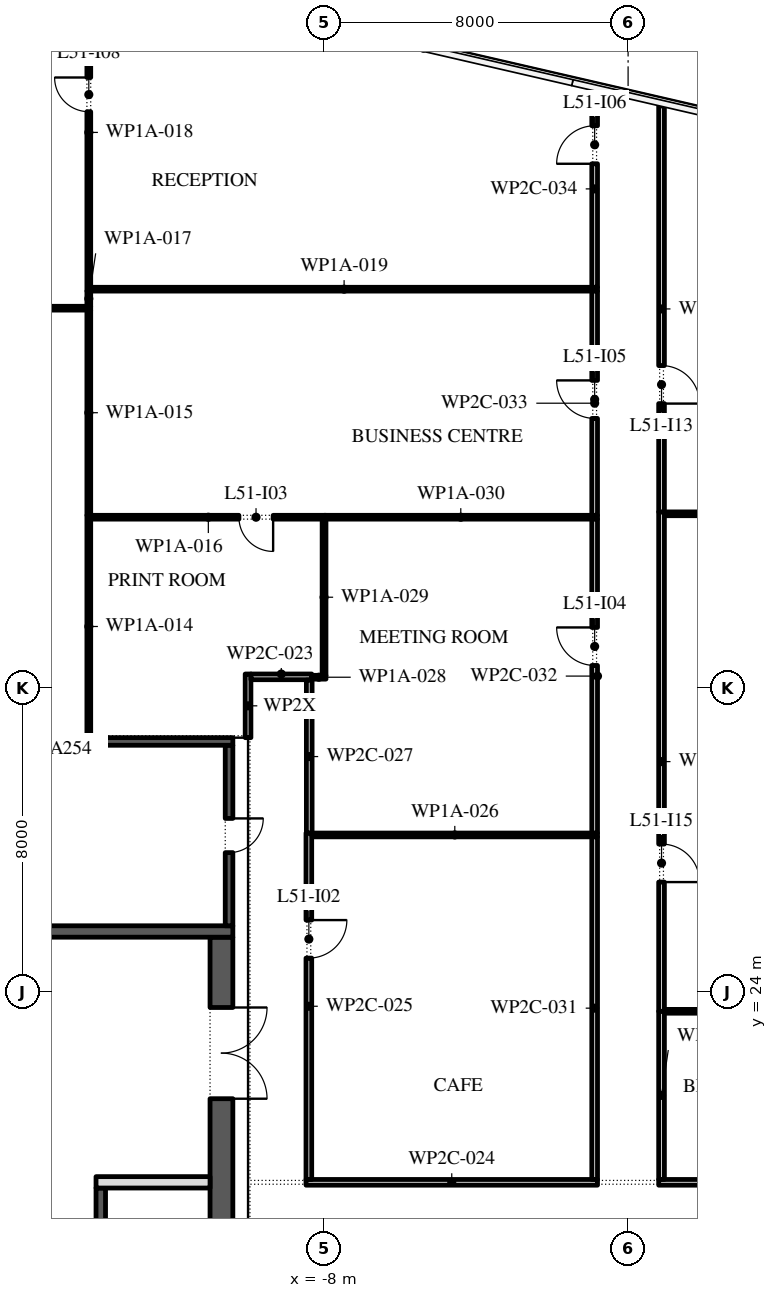
"""IFC4 building model, lengths in metres.
Left out: names, types, materials, properties, quantities, classifications, styles, units other than length and angle.
Written with IfcOpenShell. Run it as: python <this file> out.ifc"""

import sys

from ifc_helpers import new_model, si_unit, direction, frame, frame_2d, origin, place, context, subcontext, project, spatial, rectangle, extrude, element, fill, save


model = new_model("IFC4")
c1 = context("Model", 3, precision=1e-05, world=origin(), true_north=direction((0.0, 1.0)))
c2 = subcontext(c1, "Body", "Model", "MODEL_VIEW")
j1 = project(units=[si_unit("LENGTHUNIT", "METRE"), si_unit("PLANEANGLEUNIT", "RADIAN")], contexts=[c1])
p1 = place(None, origin())
s1 = spatial("IfcSite", under=j1, at=p1, CompositionType="ELEMENT")
p2 = place(p1, origin())
s2 = spatial("IfcBuilding", under=s1, at=p2, CompositionType="ELEMENT")
p3 = place(p2, frame((0.0, 0.0, 237.0)))
s3 = spatial("IfcBuildingStorey", under=s2, at=p3, CompositionType="ELEMENT", Elevation=237.0)
p4 = place(p3, frame((-10.7, -2.45, 0.0), z_axis=(0.0, 0.0, 1.0), x_axis=(0.0, 1.0, 0.0)))
e1 = element("IfcWall", 1, at=p4, inside=s3, PredefinedType="SHEAR", context=c2, shape_type="SweptSolid", body=[
    extrude(rectangle(XDim=27.9, YDim=0.6, at=frame_2d((13.95, 0.0))), origin(), (0.0, 0.0, 1.0), 5.8),
])
p5 = place(p4, frame((23.65, 0.0, 0.0)))
e2 = element("IfcOpeningElement", 2, at=p5, cuts=e1, PredefinedType="OPENING", context=c2, shape_type="SweptSolid", body=[
    extrude(rectangle(XDim=2.4, YDim=2.1, at=frame_2d((1.2, 1.05))), frame((0.0, 0.31, 0.0), z_axis=(0.0, -1.0, 0.0), x_axis=(1.0, 0.0, 0.0)), (0.0, 0.0, 1.0), 0.62),
])
p6 = place(p4, frame((0.788, 0.0, 0.0)))
e3 = element("IfcOpeningElement", 3, at=p6, cuts=e1, PredefinedType="OPENING", context=c2, shape_type="SweptSolid", body=[
    extrude(rectangle(XDim=0.9, YDim=2.1, at=frame_2d((0.45, 1.05))), frame((0.0, 0.31, 0.0), z_axis=(0.0, -1.0, 0.0), x_axis=(1.0, 0.0, 0.0)), (0.0, 0.0, 1.0), 0.62),
])
p7 = place(p4, frame((3.962, 0.0, 0.0)))
e4 = element("IfcOpeningElement", 4, at=p7, cuts=e1, PredefinedType="OPENING", context=c2, shape_type="SweptSolid", body=[
    extrude(rectangle(XDim=1.0, YDim=2.1, at=frame_2d((0.5, 1.05))), frame((0.0, 0.31, 0.0), z_axis=(0.0, -1.0, 0.0), x_axis=(1.0, 0.0, 0.0)), (0.0, 0.0, 1.0), 0.62),
])
p8 = place(p3, frame((-21.6, 25.6, 0.0), z_axis=(0.0, 0.0, 1.0), x_axis=(1.0, 0.0, 0.0)))
e5 = element("IfcWall", 5, at=p8, inside=s3, PredefinedType="SHEAR", context=c2, shape_type="SweptSolid", body=[
    extrude(rectangle(XDim=11.2, YDim=0.3, at=frame_2d((5.6, 0.0))), origin(), (0.0, 0.0, 1.0), 5.8),
])
p9 = place(p3, frame((-13.875, -2.45, 0.0), z_axis=(0.0, 0.0, 1.0), x_axis=(0.0, 1.0, 0.0)))
e6 = element("IfcWall", 6, at=p9, inside=s3, PredefinedType="SHEAR", context=c2, shape_type="SweptSolid", body=[
    extrude(rectangle(XDim=21.3, YDim=0.25, at=frame_2d((10.65, 0.0))), origin(), (0.0, 0.0, 1.0), 5.8),
])
p10 = place(p9, frame((17.786, 0.0, 0.0)))
e7 = element("IfcOpeningElement", 7, at=p10, cuts=e6, PredefinedType="OPENING", context=c2, shape_type="SweptSolid", body=[
    extrude(rectangle(XDim=0.9, YDim=2.1, at=frame_2d((0.45, 1.05))), frame((0.0, 0.135, 0.0), z_axis=(0.0, -1.0, 0.0), x_axis=(1.0, 0.0, 0.0)), (0.0, 0.0, 1.0), 0.27),
])
p11 = place(p9, frame((6.971, 0.0, 0.0)))
e8 = element("IfcOpeningElement", 8, at=p11, cuts=e6, PredefinedType="OPENING", context=c2, shape_type="SweptSolid", body=[
    extrude(rectangle(XDim=1.1, YDim=2.1, at=frame_2d((0.55, 1.05))), frame((0.0, 0.135, 0.0), z_axis=(0.0, -1.0, 0.0), x_axis=(1.0, 0.0, 0.0)), (0.0, 0.0, 1.0), 0.27),
])
p12 = place(p9, frame((9.114, 0.0, 0.0)))
e9 = element("IfcOpeningElement", 9, at=p12, cuts=e6, PredefinedType="OPENING", context=c2, shape_type="SweptSolid", body=[
    extrude(rectangle(XDim=1.1, YDim=2.1, at=frame_2d((0.55, 1.05))), frame((0.0, 0.135, 0.0), z_axis=(0.0, -1.0, 0.0), x_axis=(1.0, 0.0, 0.0)), (0.0, 0.0, 1.0), 0.27),
])
p13 = place(p9, frame((11.257, 0.0, 0.0)))
e10 = element("IfcOpeningElement", 10, at=p13, cuts=e6, PredefinedType="OPENING", context=c2, shape_type="SweptSolid", body=[
    extrude(rectangle(XDim=1.1, YDim=2.1, at=frame_2d((0.55, 1.05))), frame((0.0, 0.135, 0.0), z_axis=(0.0, -1.0, 0.0), x_axis=(1.0, 0.0, 0.0)), (0.0, 0.0, 1.0), 0.27),
])
p14 = place(p9, frame((13.4, 0.0, 0.0)))
e11 = element("IfcOpeningElement", 11, at=p14, cuts=e6, PredefinedType="OPENING", context=c2, shape_type="SweptSolid", body=[
    extrude(rectangle(XDim=1.1, YDim=2.1, at=frame_2d((0.55, 1.05))), frame((0.0, 0.135, 0.0), z_axis=(0.0, -1.0, 0.0), x_axis=(1.0, 0.0, 0.0)), (0.0, 0.0, 1.0), 0.27),
])
p15 = place(p3, frame((-14.0, 19.0, 0.0), z_axis=(0.0, 0.0, 1.0), x_axis=(1.0, 0.0, 0.0)))
e12 = element("IfcWall", 12, at=p15, inside=s3, PredefinedType="PARTITIONING", context=c2, shape_type="SweptSolid", body=[
    extrude(rectangle(XDim=3.0, YDim=0.3, at=frame_2d((1.5, 0.0))), origin(), (0.0, 0.0, 1.0), 5.8),
])
p16 = place(p3, frame((-10.5, 25.75, 0.0), z_axis=(0.0, 0.0, 1.0), x_axis=(0.0, 1.0, 0.0)))
e13 = element("IfcWall", 13, at=p16, inside=s3, PredefinedType="SHEAR", context=c2, shape_type="SweptSolid", body=[
    extrude(rectangle(XDim=4.75, YDim=0.2, at=frame_2d((2.375, 0.0))), origin(), (0.0, 0.0, 1.0), 5.8),
])
p17 = place(p16, frame((1.925, 0.0, 0.0)))
e14 = element("IfcOpeningElement", 14, at=p17, cuts=e13, PredefinedType="OPENING", context=c2, shape_type="SweptSolid", body=[
    extrude(rectangle(XDim=0.9, YDim=2.1, at=frame_2d((0.45, 1.05))), frame((0.0, 0.11, 0.0), z_axis=(0.0, -1.0, 0.0), x_axis=(1.0, 0.0, 0.0)), (0.0, 0.0, 1.0), 0.22),
])
p18 = place(p3, frame((-21.6, 30.6, 0.0), z_axis=(0.0, 0.0, 1.0), x_axis=(1.0, 0.0, 0.0)))
e15 = element("IfcWall", 15, at=p18, inside=s3, PredefinedType="SHEAR", context=c2, shape_type="SweptSolid", body=[
    extrude(rectangle(XDim=11.2, YDim=0.2, at=frame_2d((5.6, 0.0))), origin(), (0.0, 0.0, 1.0), 5.8),
])
p19 = place(p3, frame((-22.03, 42.0, 0.0), z_axis=(0.0, 0.0, 1.0), x_axis=(1.0, 0.0, 0.0)))
e16 = element("IfcWall", 16, at=p19, inside=s3, PredefinedType="PARTITIONING", context=c2, shape_type="SweptSolid", body=[
    extrude(rectangle(XDim=7.89, YDim=0.1, at=frame_2d((3.945, 0.0))), origin(), (0.0, 0.0, 1.0), 5.8),
])
p20 = place(p3, frame((-14.19, 30.7, 0.0), z_axis=(0.0, 0.0, 1.0), x_axis=(0.0, 1.0, 0.0)))
e17 = element("IfcWall", 17, at=p20, inside=s3, PredefinedType="PARTITIONING", context=c2, shape_type="SweptSolid", body=[
    extrude(rectangle(XDim=5.85, YDim=0.1, at=frame_2d((2.925, 0.0))), origin(), (0.0, 0.0, 1.0), 5.8),
])
p21 = place(p3, frame((-14.19, 36.55, 0.0), z_axis=(0.0, 0.0, 1.0), x_axis=(0.0, 1.0, 0.0)))
e18 = element("IfcWall", 18, at=p21, inside=s3, PredefinedType="PARTITIONING", context=c2, shape_type="SweptSolid", body=[
    extrude(rectangle(XDim=5.4, YDim=0.1, at=frame_2d((2.7, 0.0))), origin(), (0.0, 0.0, 1.0), 5.8),
])
p22 = place(p3, frame((-14.14, 36.5, 0.0), z_axis=(0.0, 0.0, 1.0), x_axis=(1.0, 0.0, 0.0)))
e19 = element("IfcWall", 19, at=p22, inside=s3, PredefinedType="PARTITIONING", context=c2, shape_type="SweptSolid", body=[
    extrude(rectangle(XDim=6.19, YDim=0.1, at=frame_2d((3.095, 0.0))), origin(), (0.0, 0.0, 1.0), 5.8),
])
p23 = place(p22, frame((3.9, 0.0, 0.0)))
e20 = element("IfcOpeningElement", 20, at=p23, cuts=e19, PredefinedType="OPENING", context=c2, shape_type="SweptSolid", body=[
    extrude(rectangle(XDim=0.9, YDim=2.1, at=frame_2d((0.45, 1.05))), frame((0.0, 0.06, 0.0), z_axis=(0.0, -1.0, 0.0), x_axis=(1.0, 0.0, 0.0)), (0.0, 0.0, 1.0), 0.12),
])
p24 = place(p3, frame((-14.19, 42.05, 0.0), z_axis=(0.0, 0.0, 1.0), x_axis=(0.0, 1.0, 0.0)))
e21 = element("IfcWall", 21, at=p24, inside=s3, PredefinedType="PARTITIONING", context=c2, shape_type="SweptSolid", body=[
    extrude(rectangle(XDim=0.4, YDim=0.1, at=frame_2d((0.2, 0.0))), origin(), (0.0, 0.0, 1.0), 5.8),
])
p25 = place(p3, frame((-14.19, 42.45, 0.0), z_axis=(0.0, 0.0, 1.0), x_axis=(0.0, 1.0, 0.0)))
e22 = element("IfcWall", 22, at=p25, inside=s3, PredefinedType="PARTITIONING", context=c2, shape_type="SweptSolid", body=[
    extrude(rectangle(XDim=8.35, YDim=0.1, at=frame_2d((4.175, 0.0))), origin(), (0.0, 0.0, 1.0), 5.8),
])
p26 = place(p25, frame((4.72, 0.0, 0.0)))
e23 = element("IfcOpeningElement", 23, at=p26, cuts=e22, PredefinedType="OPENING", context=c2, shape_type="SweptSolid", body=[
    extrude(rectangle(XDim=0.9, YDim=2.1, at=frame_2d((0.45, 1.05))), frame((0.0, 0.06, 0.0), z_axis=(0.0, -1.0, 0.0), x_axis=(1.0, 0.0, 0.0)), (0.0, 0.0, 1.0), 0.12),
])
p27 = place(p3, frame((-14.14, 42.5, 0.0), z_axis=(0.0, 0.0, 1.0), x_axis=(1.0, 0.0, 0.0)))
e24 = element("IfcWall", 24, at=p27, inside=s3, PredefinedType="PARTITIONING", context=c2, shape_type="SweptSolid", body=[
    extrude(rectangle(XDim=13.335, YDim=0.1, at=frame_2d((6.667, 0.0))), origin(), (0.0, 0.0, 1.0), 5.8),
])
p28 = place(p3, frame((-10.0, 30.7, 0.0), z_axis=(0.0, 0.0, 1.0), x_axis=(0.0, 1.0, 0.0)))
e25 = element("IfcWall", 25, at=p28, inside=s3, PredefinedType="PARTITIONING", context=c2, shape_type="SweptSolid", body=[
    extrude(rectangle(XDim=1.675, YDim=0.15, at=frame_2d((0.837, 0.0))), origin(), (0.0, 0.0, 1.0), 4.82),
])
p29 = place(p3, frame((-9.925, 32.3, 0.0), z_axis=(0.0, 0.0, 1.0), x_axis=(1.0, 0.0, 0.0)))
e26 = element("IfcWall", 26, at=p29, inside=s3, PredefinedType="PARTITIONING", context=c2, shape_type="SweptSolid", body=[
    extrude(rectangle(XDim=1.6, YDim=0.15, at=frame_2d((0.8, 0.0))), origin(), (0.0, 0.0, 1.0), 5.8),
])
p30 = place(p3, frame((-8.475, 19.0, 0.0), z_axis=(0.0, 0.0, 1.0), x_axis=(1.0, 0.0, 0.0)))
e27 = element("IfcWall", 27, at=p30, inside=s3, PredefinedType="PARTITIONING", context=c2, shape_type="SweptSolid", body=[
    extrude(rectangle(XDim=7.67, YDim=0.15, at=frame_2d((3.835, 0.0))), origin(), (0.0, 0.0, 1.0), 5.8),
])
p31 = place(p3, frame((-8.4, 28.19, 0.0), z_axis=(0.0, 0.0, 1.0), x_axis=(0.0, -1.0, 0.0)))
e28 = element("IfcWall", 28, at=p31, inside=s3, PredefinedType="PARTITIONING", context=c2, shape_type="SweptSolid", body=[
    extrude(rectangle(XDim=9.115, YDim=0.15, at=frame_2d((4.558, 0.0))), origin(), (0.0, 0.0, 1.0), 5.8),
])
p32 = place(p31, frame((2.29, 0.0, 0.0)))
e29 = element("IfcOpeningElement", 29, at=p32, cuts=e28, PredefinedType="OPENING", context=c2, shape_type="SweptSolid", body=[
    extrude(rectangle(XDim=1.0, YDim=2.1, at=frame_2d((0.5, 1.05))), frame((0.0, 0.085, 0.0), z_axis=(0.0, -1.0, 0.0), x_axis=(1.0, 0.0, 0.0)), (0.0, 0.0, 1.0), 0.17),
])
p33 = place(p3, frame((-8.315, 28.14, 0.0), z_axis=(0.0, 0.0, 1.0), x_axis=(1.0, 0.0, 0.0)))
e30 = element("IfcWall", 30, at=p33, inside=s3, PredefinedType="PARTITIONING", context=c2, shape_type="SweptSolid", body=[
    extrude(rectangle(XDim=7.51, YDim=0.1, at=frame_2d((3.755, 0.0))), origin(), (0.0, 0.0, 1.0), 5.8),
])
p34 = place(p3, frame((-8.39, 32.215, 0.0), z_axis=(0.0, 0.0, 1.0), x_axis=(0.0, -1.0, 0.0)))
e31 = element("IfcWall", 31, at=p34, inside=s3, PredefinedType="PARTITIONING", context=c2, shape_type="SweptSolid", body=[
    extrude(rectangle(XDim=4.025, YDim=0.15, at=frame_2d((2.013, 0.0))), origin(), (0.0, 0.0, 1.0), 5.8),
])
p35 = place(p3, frame((-7.95, 32.29, 0.0), z_axis=(0.0, 0.0, 1.0), x_axis=(-1.0, 0.0, 0.0)))
e32 = element("IfcWall", 32, at=p35, inside=s3, PredefinedType="PARTITIONING", context=c2, shape_type="SweptSolid", body=[
    extrude(rectangle(XDim=0.375, YDim=0.1, at=frame_2d((0.188, 0.0))), origin(), (0.0, 0.0, 1.0), 5.8),
])
p36 = place(p3, frame((-8.0, 36.45, 0.0), z_axis=(0.0, 0.0, 1.0), x_axis=(0.0, -1.0, 0.0)))
e33 = element("IfcWall", 33, at=p36, inside=s3, PredefinedType="PARTITIONING", context=c2, shape_type="SweptSolid", body=[
    extrude(rectangle(XDim=4.11, YDim=0.1, at=frame_2d((2.055, 0.0))), origin(), (0.0, 0.0, 1.0), 5.8),
])
p37 = place(p3, frame((-8.0, 36.5, 0.0), z_axis=(0.0, 0.0, 1.0), x_axis=(1.0, 0.0, 0.0)))
e34 = element("IfcWall", 34, at=p37, inside=s3, PredefinedType="PARTITIONING", context=c2, shape_type="SweptSolid", body=[
    extrude(rectangle(XDim=7.195, YDim=0.1, at=frame_2d((3.598, 0.0))), origin(), (0.0, 0.0, 1.0), 5.8),
])
p38 = place(p3, frame((-0.88, 19.075, 0.0), z_axis=(0.0, 0.0, 1.0), x_axis=(0.0, 1.0, 0.0)))
e35 = element("IfcWall", 35, at=p38, inside=s3, PredefinedType="PARTITIONING", context=c2, shape_type="SweptSolid", body=[
    extrude(rectangle(XDim=9.015, YDim=0.15, at=frame_2d((4.508, 0.0))), origin(), (0.0, 0.0, 1.0), 5.8),
])
p39 = place(p3, frame((-0.88, 28.19, 0.0), z_axis=(0.0, 0.0, 1.0), x_axis=(0.0, 1.0, 0.0)))
e36 = element("IfcWall", 36, at=p39, inside=s3, PredefinedType="PARTITIONING", context=c2, shape_type="SweptSolid", body=[
    extrude(rectangle(XDim=8.26, YDim=0.15, at=frame_2d((4.13, 0.0))), origin(), (0.0, 0.0, 1.0), 5.8),
])
p40 = place(p39, frame((4.41, 0.0, 0.0)))
e37 = element("IfcOpeningElement", 37, at=p40, cuts=e36, PredefinedType="OPENING", context=c2, shape_type="SweptSolid", body=[
    extrude(rectangle(XDim=1.0, YDim=2.1, at=frame_2d((0.5, 1.05))), frame((0.0, 0.085, 0.0), z_axis=(0.0, -1.0, 0.0), x_axis=(1.0, 0.0, 0.0)), (0.0, 0.0, 1.0), 0.17),
])
p41 = place(p3, frame((-0.88, 36.55, 0.0), z_axis=(0.0, 0.0, 1.0), x_axis=(0.0, 1.0, 0.0)))
e38 = element("IfcWall", 38, at=p41, inside=s3, PredefinedType="PARTITIONING", context=c2, shape_type="SweptSolid", body=[
    extrude(rectangle(XDim=5.9, YDim=0.15, at=frame_2d((2.95, 0.0))), origin(), (0.0, 0.0, 1.0), 5.8),
])
p42 = place(p41, frame((2.55, 0.0, 0.0)))
e39 = element("IfcOpeningElement", 39, at=p42, cuts=e38, PredefinedType="OPENING", context=c2, shape_type="SweptSolid", body=[
    extrude(rectangle(XDim=1.0, YDim=2.1, at=frame_2d((0.5, 1.05))), frame((0.0, 0.085, 0.0), z_axis=(0.0, -1.0, 0.0), x_axis=(1.0, 0.0, 0.0)), (0.0, 0.0, 1.0), 0.17),
])
p43 = place(p3, frame((-0.88, 42.55, 0.0), z_axis=(0.0, 0.0, 1.0), x_axis=(0.0, 1.0, 0.0)))
e40 = element("IfcWall", 40, at=p43, inside=s3, PredefinedType="PARTITIONING", context=c2, shape_type="SweptSolid", body=[
    extrude(rectangle(XDim=5.178, YDim=0.15, at=frame_2d((2.589, 0.0))), origin(), (0.0, 0.0, 1.0), 5.8),
])
p44 = place(p43, frame((3.25, 0.0, 0.0)))
e41 = element("IfcOpeningElement", 41, at=p44, cuts=e40, PredefinedType="OPENING", context=c2, shape_type="SweptSolid", body=[
    extrude(rectangle(XDim=1.0, YDim=2.1, at=frame_2d((0.5, 1.05))), frame((0.0, 0.085, 0.0), z_axis=(0.0, -1.0, 0.0), x_axis=(1.0, 0.0, 0.0)), (0.0, 0.0, 1.0), 0.17),
])
p45 = place(p3, frame((0.805, 19.0, 0.0), z_axis=(0.0, 0.0, 1.0), x_axis=(1.0, 0.0, 0.0)))
e42 = element("IfcWall", 42, at=p45, inside=s3, PredefinedType="PARTITIONING", context=c2, shape_type="SweptSolid", body=[
    extrude(rectangle(XDim=7.67, YDim=0.15, at=frame_2d((3.835, 0.0))), origin(), (0.0, 0.0, 1.0), 5.8),
])
p46 = place(p45, frame((4.195, 0.0, 0.0)))
e43 = element("IfcOpeningElement", 43, at=p46, cuts=e42, PredefinedType="OPENING", context=c2, shape_type="SweptSolid", body=[
    extrude(rectangle(XDim=1.0, YDim=2.1, at=frame_2d((0.5, 1.05))), frame((0.0, 0.085, 0.0), z_axis=(0.0, -1.0, 0.0), x_axis=(1.0, 0.0, 0.0)), (0.0, 0.0, 1.0), 0.17),
])
p47 = place(p3, frame((0.88, 23.5, 0.0), z_axis=(0.0, 0.0, 1.0), x_axis=(0.0, -1.0, 0.0)))
e44 = element("IfcWall", 44, at=p47, inside=s3, PredefinedType="PARTITIONING", context=c2, shape_type="SweptSolid", body=[
    extrude(rectangle(XDim=4.425, YDim=0.15, at=frame_2d((2.212, 0.0))), origin(), (0.0, 0.0, 1.0), 5.8),
])
p48 = place(p3, frame((0.955, 23.5, 0.0), z_axis=(0.0, 0.0, 1.0), x_axis=(1.0, 0.0, 0.0)))
e45 = element("IfcWall", 45, at=p48, inside=s3, PredefinedType="PARTITIONING", context=c2, shape_type="SweptSolid", body=[
    extrude(rectangle(XDim=5.385, YDim=0.1, at=frame_2d((2.692, 0.0))), origin(), (0.0, 0.0, 1.0), 5.8),
])
p49 = place(p3, frame((0.88, 36.64, 0.0), z_axis=(0.0, 0.0, 1.0), x_axis=(0.0, -1.0, 0.0)))
e46 = element("IfcWall", 46, at=p49, inside=s3, PredefinedType="PARTITIONING", context=c2, shape_type="SweptSolid", body=[
    extrude(rectangle(XDim=13.14, YDim=0.15, at=frame_2d((6.57, 0.0))), origin(), (0.0, 0.0, 1.0), 5.8),
])
p50 = place(p49, frame((8.74, 0.0, 0.0)))
e47 = element("IfcOpeningElement", 47, at=p50, cuts=e46, PredefinedType="OPENING", context=c2, shape_type="SweptSolid", body=[
    extrude(rectangle(XDim=1.0, YDim=2.1, at=frame_2d((0.5, 1.05))), frame((0.0, 0.085, 0.0), z_axis=(0.0, -1.0, 0.0), x_axis=(1.0, 0.0, 0.0)), (0.0, 0.0, 1.0), 0.17),
])
p51 = place(p3, frame((0.88, 47.321, 0.0), z_axis=(0.0, 0.0, 1.0), x_axis=(0.0, -1.0, 0.0)))
e48 = element("IfcWall", 48, at=p51, inside=s3, PredefinedType="PARTITIONING", context=c2, shape_type="SweptSolid", body=[
    extrude(rectangle(XDim=10.681, YDim=0.15, at=frame_2d((5.341, 0.0))), origin(), (0.0, 0.0, 1.0), 5.8),
])
p52 = place(p51, frame((6.831, 0.0, 0.0)))
e49 = element("IfcOpeningElement", 49, at=p52, cuts=e48, PredefinedType="OPENING", context=c2, shape_type="SweptSolid", body=[
    extrude(rectangle(XDim=1.0, YDim=2.1, at=frame_2d((0.5, 1.05))), frame((0.0, 0.085, 0.0), z_axis=(0.0, -1.0, 0.0), x_axis=(1.0, 0.0, 0.0)), (0.0, 0.0, 1.0), 0.17),
])
p53 = place(p3, frame((6.39, 36.59, 0.0), z_axis=(0.0, 0.0, 1.0), x_axis=(-1.0, 0.0, 0.0)))
e50 = element("IfcWall", 50, at=p53, inside=s3, PredefinedType="PARTITIONING", context=c2, shape_type="SweptSolid", body=[
    extrude(rectangle(XDim=5.435, YDim=0.1, at=frame_2d((2.717, 0.0))), origin(), (0.0, 0.0, 1.0), 5.8),
])
p54 = place(p5, frame((2.4, 0.0, 0.0), z_axis=(0.0, 0.0, 1.0), x_axis=(-1.0, 0.0, 0.0)))
e51 = element("IfcDoor", 51, at=p54, inside=s3, OperationType="DOUBLE_DOOR_SINGLE_SWING", PredefinedType="DOOR", context=c2, shape_type="SweptSolid", body=[
    extrude(rectangle(XDim=2.4, YDim=2.1, at=frame_2d((1.2, 1.05))), frame((0.0, 0.025, 0.0), z_axis=(0.0, -1.0, 0.0), x_axis=(1.0, 0.0, 0.0)), (0.0, 0.0, 1.0), 0.05),
])
fill(e2, e51)
p55 = place(p17, frame((0.9, 0.15, 0.0), z_axis=(0.0, 0.0, 1.0), x_axis=(-1.0, 0.0, 0.0)))
e52 = element("IfcDoor", 52, at=p55, inside=s3, OperationType="SINGLE_SWING_RIGHT", PredefinedType="DOOR", context=c2, shape_type="SweptSolid", body=[
    extrude(rectangle(XDim=0.9, YDim=2.1, at=frame_2d((0.45, 1.05))), frame((0.0, 0.1, 0.0), z_axis=(0.0, -1.0, 0.0), x_axis=(1.0, 0.0, 0.0)), (0.0, 0.0, 1.0), 0.05),
])
fill(e14, e52)
p56 = place(p32, origin())
e53 = element("IfcDoor", 53, at=p56, inside=s3, OperationType="SINGLE_SWING_RIGHT", PredefinedType="DOOR", context=c2, shape_type="SweptSolid", body=[
    extrude(rectangle(XDim=1.0, YDim=2.1, at=frame_2d((0.5, 1.05))), frame((0.0, 0.025, 0.0), z_axis=(0.0, -1.0, 0.0), x_axis=(1.0, 0.0, 0.0)), (0.0, 0.0, 1.0), 0.05),
])
fill(e29, e53)
p57 = place(p23, frame((0.9, 0.0, 0.0), z_axis=(0.0, 0.0, 1.0), x_axis=(-1.0, 0.0, 0.0)))
e54 = element("IfcDoor", 54, at=p57, inside=s3, OperationType="SINGLE_SWING_RIGHT", PredefinedType="DOOR", context=c2, shape_type="SweptSolid", body=[
    extrude(rectangle(XDim=0.9, YDim=2.1, at=frame_2d((0.45, 1.05))), frame((0.0, 0.025, 0.0), z_axis=(0.0, -1.0, 0.0), x_axis=(1.0, 0.0, 0.0)), (0.0, 0.0, 1.0), 0.05),
])
fill(e20, e54)
p58 = place(p40, origin())
e55 = element("IfcDoor", 55, at=p58, inside=s3, OperationType="SINGLE_SWING_LEFT", PredefinedType="DOOR", context=c2, shape_type="SweptSolid", body=[
    extrude(rectangle(XDim=1.0, YDim=2.1, at=frame_2d((0.5, 1.05))), frame((0.0, 0.025, 0.0), z_axis=(0.0, -1.0, 0.0), x_axis=(1.0, 0.0, 0.0)), (0.0, 0.0, 1.0), 0.05),
])
fill(e37, e55)
p59 = place(p42, origin())
e56 = element("IfcDoor", 56, at=p59, inside=s3, OperationType="SINGLE_SWING_LEFT", PredefinedType="DOOR", context=c2, shape_type="SweptSolid", body=[
    extrude(rectangle(XDim=1.0, YDim=2.1, at=frame_2d((0.5, 1.05))), frame((0.0, 0.025, 0.0), z_axis=(0.0, -1.0, 0.0), x_axis=(1.0, 0.0, 0.0)), (0.0, 0.0, 1.0), 0.05),
])
fill(e39, e56)
p60 = place(p44, origin())
e57 = element("IfcDoor", 57, at=p60, inside=s3, OperationType="SINGLE_SWING_RIGHT", PredefinedType="DOOR", context=c2, shape_type="SweptSolid", body=[
    extrude(rectangle(XDim=1.0, YDim=2.1, at=frame_2d((0.5, 1.05))), frame((0.0, 0.025, 0.0), z_axis=(0.0, -1.0, 0.0), x_axis=(1.0, 0.0, 0.0)), (0.0, 0.0, 1.0), 0.05),
])
fill(e41, e57)
p61 = place(p26, origin())
e58 = element("IfcDoor", 58, at=p61, inside=s3, OperationType="SINGLE_SWING_LEFT", PredefinedType="DOOR", context=c2, shape_type="SweptSolid", body=[
    extrude(rectangle(XDim=0.9, YDim=2.1, at=frame_2d((0.45, 1.05))), frame((0.0, 0.025, 0.0), z_axis=(0.0, -1.0, 0.0), x_axis=(1.0, 0.0, 0.0)), (0.0, 0.0, 1.0), 0.05),
])
fill(e23, e58)
p62 = place(p52, origin())
e59 = element("IfcDoor", 59, at=p62, inside=s3, OperationType="SINGLE_SWING_LEFT", PredefinedType="DOOR", context=c2, shape_type="SweptSolid", body=[
    extrude(rectangle(XDim=1.0, YDim=2.1, at=frame_2d((0.5, 1.05))), frame((0.0, 0.025, 0.0), z_axis=(0.0, -1.0, 0.0), x_axis=(1.0, 0.0, 0.0)), (0.0, 0.0, 1.0), 0.05),
])
fill(e49, e59)
p63 = place(p50, origin())
e60 = element("IfcDoor", 60, at=p63, inside=s3, OperationType="SINGLE_SWING_LEFT", PredefinedType="DOOR", context=c2, shape_type="SweptSolid", body=[
    extrude(rectangle(XDim=1.0, YDim=2.1, at=frame_2d((0.5, 1.05))), frame((0.0, 0.025, 0.0), z_axis=(0.0, -1.0, 0.0), x_axis=(1.0, 0.0, 0.0)), (0.0, 0.0, 1.0), 0.05),
])
fill(e47, e60)
save(model, sys.argv[1])
